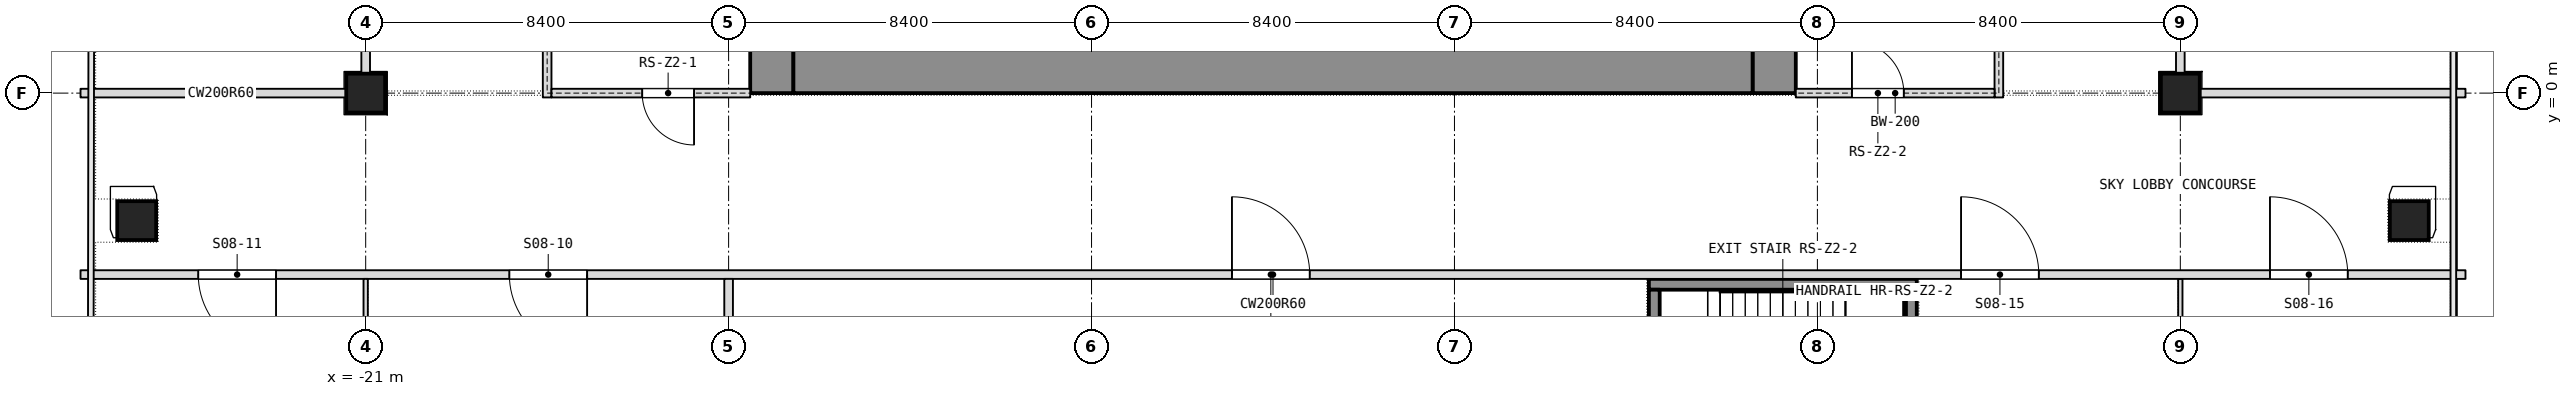
"""IFC4 building model, lengths in metres.
Left out: names, types, materials, properties, quantities, classifications, styles, units other than length and angle.
Written with IfcOpenShell. Run it as: python <this file> out.ifc"""

import sys

from ifc_helpers import new_model, si_unit, direction, frame, frame_2d, origin, origin_2d, place, context, subcontext, project, spatial, rectangle, extrude, element, fill, save


model = new_model("IFC4")
c1 = context("Model", 3, precision=1e-05, world=origin(), true_north=direction((0.0, 1.0)))
c2 = subcontext(c1, "Body", "Model", "MODEL_VIEW")
j1 = project(units=[si_unit("LENGTHUNIT", "METRE"), si_unit("PLANEANGLEUNIT", "RADIAN")], contexts=[c1])
p1 = place(None, origin())
s1 = spatial("IfcSite", under=j1, at=p1, CompositionType="ELEMENT")
p2 = place(p1, origin())
s2 = spatial("IfcBuilding", under=s1, at=p2, CompositionType="ELEMENT")
p3 = place(p2, frame((0.0, 0.0, 97.7)))
s3 = spatial("IfcBuildingStorey", under=s2, at=p3, CompositionType="ELEMENT", Elevation=97.7)
p4 = place(p3, frame((11.6, 0.0, 0.0), z_axis=(0.0, 0.0, 1.0), x_axis=(0.0, 1.0, 0.0)))
e1 = element("IfcWall", 1, at=p4, inside=s3, PredefinedType="SHEAR", context=c2, shape_type="SweptSolid", body=[
    extrude(rectangle(XDim=16.8, YDim=1.0, at=frame_2d((8.4, 0.0))), origin(), (0.0, 0.0, 1.0), 7.2),
])
p5 = place(p4, frame((2.3, 0.0, 0.0)))
e2 = element("IfcOpeningElement", 2, at=p5, cuts=e1, PredefinedType="OPENING", context=c2, shape_type="SweptSolid", body=[
    extrude(rectangle(XDim=1.1, YDim=2.1, at=frame_2d((0.55, 1.05))), frame((0.0, 0.5, 0.0), z_axis=(0.0, -1.0, 0.0), x_axis=(1.0, 0.0, 0.0)), (0.0, 0.0, 1.0), 1.0),
])
p6 = place(p4, frame((4.85, 0.0, 0.0)))
e3 = element("IfcOpeningElement", 3, at=p6, cuts=e1, PredefinedType="OPENING", context=c2, shape_type="SweptSolid", body=[
    extrude(rectangle(XDim=1.1, YDim=2.1, at=frame_2d((0.55, 1.05))), frame((0.0, 0.5, 0.0), z_axis=(0.0, -1.0, 0.0), x_axis=(1.0, 0.0, 0.0)), (0.0, 0.0, 1.0), 1.0),
])
p7 = place(p4, frame((6.825, 0.0, 0.0)))
e4 = element("IfcOpeningElement", 4, at=p7, cuts=e1, PredefinedType="OPENING", context=c2, shape_type="SweptSolid", body=[
    extrude(rectangle(XDim=1.2, YDim=2.1, at=frame_2d((0.6, 1.05))), frame((0.0, 0.5, 0.0), z_axis=(0.0, -1.0, 0.0), x_axis=(1.0, 0.0, 0.0)), (0.0, 0.0, 1.0), 1.0),
])
p8 = place(p4, frame((13.4, 0.0, 0.0)))
e5 = element("IfcOpeningElement", 5, at=p8, cuts=e1, PredefinedType="OPENING", context=c2, shape_type="SweptSolid", body=[
    extrude(rectangle(XDim=1.1, YDim=2.1, at=frame_2d((0.55, 1.05))), frame((0.0, 0.5, 0.0), z_axis=(0.0, -1.0, 0.0), x_axis=(1.0, 0.0, 0.0)), (0.0, 0.0, 1.0), 1.0),
])
p9 = place(p4, frame((10.85, 0.0, 0.0)))
e6 = element("IfcOpeningElement", 6, at=p9, cuts=e1, PredefinedType="OPENING", context=c2, shape_type="SweptSolid", body=[
    extrude(rectangle(XDim=1.1, YDim=2.1, at=frame_2d((0.55, 1.05))), frame((0.0, 0.5, 0.0), z_axis=(0.0, -1.0, 0.0), x_axis=(1.0, 0.0, 0.0)), (0.0, 0.0, 1.0), 1.0),
])
p10 = place(p4, frame((8.775, 0.0, 0.0)))
e7 = element("IfcOpeningElement", 7, at=p10, cuts=e1, PredefinedType="OPENING", context=c2, shape_type="SweptSolid", body=[
    extrude(rectangle(XDim=1.2, YDim=2.1, at=frame_2d((0.6, 1.05))), frame((0.0, 0.5, 0.0), z_axis=(0.0, -1.0, 0.0), x_axis=(1.0, 0.0, 0.0)), (0.0, 0.0, 1.0), 1.0),
])
p11 = place(p3, frame((-11.6, 0.0, 0.0), z_axis=(0.0, 0.0, 1.0), x_axis=(0.0, 1.0, 0.0)))
e8 = element("IfcWall", 8, at=p11, inside=s3, PredefinedType="SHEAR", context=c2, shape_type="SweptSolid", body=[
    extrude(rectangle(XDim=16.8, YDim=1.0, at=frame_2d((8.4, 0.0))), origin(), (0.0, 0.0, 1.0), 7.2),
])
p12 = place(p11, frame((2.3, 0.0, 0.0)))
e9 = element("IfcOpeningElement", 9, at=p12, cuts=e8, PredefinedType="OPENING", context=c2, shape_type="SweptSolid", body=[
    extrude(rectangle(XDim=1.1, YDim=2.1, at=frame_2d((0.55, 1.05))), frame((0.0, 0.5, 0.0), z_axis=(0.0, -1.0, 0.0), x_axis=(1.0, 0.0, 0.0)), (0.0, 0.0, 1.0), 1.0),
])
p13 = place(p11, frame((4.85, 0.0, 0.0)))
e10 = element("IfcOpeningElement", 10, at=p13, cuts=e8, PredefinedType="OPENING", context=c2, shape_type="SweptSolid", body=[
    extrude(rectangle(XDim=1.1, YDim=2.1, at=frame_2d((0.55, 1.05))), frame((0.0, 0.5, 0.0), z_axis=(0.0, -1.0, 0.0), x_axis=(1.0, 0.0, 0.0)), (0.0, 0.0, 1.0), 1.0),
])
p14 = place(p11, frame((6.825, 0.0, 0.0)))
e11 = element("IfcOpeningElement", 11, at=p14, cuts=e8, PredefinedType="OPENING", context=c2, shape_type="SweptSolid", body=[
    extrude(rectangle(XDim=1.2, YDim=2.1, at=frame_2d((0.6, 1.05))), frame((0.0, 0.5, 0.0), z_axis=(0.0, -1.0, 0.0), x_axis=(1.0, 0.0, 0.0)), (0.0, 0.0, 1.0), 1.0),
])
p15 = place(p11, frame((13.4, 0.0, 0.0)))
e12 = element("IfcOpeningElement", 12, at=p15, cuts=e8, PredefinedType="OPENING", context=c2, shape_type="SweptSolid", body=[
    extrude(rectangle(XDim=1.1, YDim=2.1, at=frame_2d((0.55, 1.05))), frame((0.0, 0.5, 0.0), z_axis=(0.0, -1.0, 0.0), x_axis=(1.0, 0.0, 0.0)), (0.0, 0.0, 1.0), 1.0),
])
p16 = place(p11, frame((10.85, 0.0, 0.0)))
e13 = element("IfcOpeningElement", 13, at=p16, cuts=e8, PredefinedType="OPENING", context=c2, shape_type="SweptSolid", body=[
    extrude(rectangle(XDim=1.1, YDim=2.1, at=frame_2d((0.55, 1.05))), frame((0.0, 0.5, 0.0), z_axis=(0.0, -1.0, 0.0), x_axis=(1.0, 0.0, 0.0)), (0.0, 0.0, 1.0), 1.0),
])
p17 = place(p11, frame((8.775, 0.0, 0.0)))
e14 = element("IfcOpeningElement", 14, at=p17, cuts=e8, PredefinedType="OPENING", context=c2, shape_type="SweptSolid", body=[
    extrude(rectangle(XDim=1.2, YDim=2.1, at=frame_2d((0.6, 1.05))), frame((0.0, 0.5, 0.0), z_axis=(0.0, -1.0, 0.0), x_axis=(1.0, 0.0, 0.0)), (0.0, 0.0, 1.0), 1.0),
])
p18 = place(p3, frame((-11.1, 0.5, 0.0), z_axis=(0.0, 0.0, 1.0), x_axis=(1.0, 0.0, 0.0)))
e15 = element("IfcWall", 15, at=p18, inside=s3, PredefinedType="SHEAR", context=c2, shape_type="SweptSolid", body=[
    extrude(rectangle(XDim=22.2, YDim=1.0, at=frame_2d((11.1, 0.0))), origin(), (0.0, 0.0, 1.0), 7.2),
])
for number, where, z_axis, x_axis in (
    (16, (-21.0, 0.0, 0.0), (0.0, 0.0, 1.0), (1.0, 0.0, 0.0)),
    (17, (21.0, 0.0, 0.0), (0.0, 0.0, 1.0), (1.0, 0.0, 0.0)),
    (18, (-26.3, -2.951, 0.0), (0.0, 0.0, 1.0), (1.0, 0.0, 0.0)),
    (19, (26.3, -2.951, 0.0), (0.0, 0.0, 1.0), (1.0, 0.0, 0.0)),
):
    element("IfcColumn", number, at=place(p3, frame(where, z_axis=z_axis, x_axis=x_axis)), inside=s3, PredefinedType="COLUMN", context=c2, shape_type="SweptSolid", body=[
        extrude(rectangle(XDim=0.9, YDim=0.9, at=origin_2d()), origin(), (0.0, 0.0, 1.0), 7.2),
    ])
p19 = place(p3, frame((21.0, -7.93, 0.0), z_axis=(0.0, 0.0, 1.0), x_axis=(0.0, 1.0, 0.0)))
e20 = element("IfcWall", 20, at=p19, inside=s3, PredefinedType="PARTITIONING", context=c2, shape_type="SweptSolid", body=[
    extrude(rectangle(XDim=3.63, YDim=0.1, at=frame_2d((1.815, 0.0))), origin(), (0.0, 0.0, 1.0), 6.94),
])
p20 = place(p3, frame((21.0, -0.1, 0.0), z_axis=(0.0, 0.0, 1.0), x_axis=(0.0, 1.0, 0.0)))
e21 = element("IfcWall", 21, at=p20, inside=s3, PredefinedType="PARTITIONING", context=c2, shape_type="SweptSolid", body=[
    extrude(rectangle(XDim=25.3, YDim=0.2, at=frame_2d((12.65, 0.0))), origin(), (0.0, 0.0, 1.0), 6.94),
])
p21 = place(p20, frame((3.8, 0.0, 0.0)))
e22 = element("IfcOpeningElement", 22, at=p21, cuts=e21, PredefinedType="OPENING", context=c2, shape_type="SweptSolid", body=[
    extrude(rectangle(XDim=1.0, YDim=2.1, at=frame_2d((0.5, 1.05))), frame((0.0, 0.1, 0.0), z_axis=(0.0, -1.0, 0.0), x_axis=(1.0, 0.0, 0.0)), (0.0, 0.0, 1.0), 0.2),
])
p22 = place(p20, frame((10.1, 0.0, 0.0)))
e23 = element("IfcOpeningElement", 23, at=p22, cuts=e21, PredefinedType="OPENING", context=c2, shape_type="SweptSolid", body=[
    extrude(rectangle(XDim=1.0, YDim=2.1, at=frame_2d((0.5, 1.05))), frame((0.0, 0.1, 0.0), z_axis=(0.0, -1.0, 0.0), x_axis=(1.0, 0.0, 0.0)), (0.0, 0.0, 1.0), 0.2),
])
p23 = place(p20, frame((14.3, 0.0, 0.0)))
e24 = element("IfcOpeningElement", 24, at=p23, cuts=e21, PredefinedType="OPENING", context=c2, shape_type="SweptSolid", body=[
    extrude(rectangle(XDim=1.0, YDim=2.1, at=frame_2d((0.5, 1.05))), frame((0.0, 0.1, 0.0), z_axis=(0.0, -1.0, 0.0), x_axis=(1.0, 0.0, 0.0)), (0.0, 0.0, 1.0), 0.2),
])
p24 = place(p20, frame((20.55, 0.0, 0.0)))
e25 = element("IfcOpeningElement", 25, at=p24, cuts=e21, PredefinedType="OPENING", context=c2, shape_type="SweptSolid", body=[
    extrude(rectangle(XDim=1.0, YDim=2.1, at=frame_2d((0.5, 1.05))), frame((0.0, 0.1, 0.0), z_axis=(0.0, -1.0, 0.0), x_axis=(1.0, 0.0, 0.0)), (0.0, 0.0, 1.0), 0.2),
])
p25 = place(p3, frame((-27.6, -4.2, 0.0), z_axis=(0.0, 0.0, 1.0), x_axis=(1.0, 0.0, 0.0)))
e26 = element("IfcWall", 26, at=p25, inside=s3, PredefinedType="PARTITIONING", context=c2, shape_type="SweptSolid", body=[
    extrude(rectangle(XDim=55.2, YDim=0.2, at=frame_2d((27.6, 0.0))), origin(), (0.0, 0.0, 1.0), 6.94),
])
p26 = place(p25, frame((9.925, 0.0, 0.0)))
e27 = element("IfcOpeningElement", 27, at=p26, cuts=e26, PredefinedType="OPENING", context=c2, shape_type="SweptSolid", body=[
    extrude(rectangle(XDim=1.8, YDim=2.1, at=frame_2d((0.9, 1.05))), frame((0.0, 0.1, 0.0), z_axis=(0.0, -1.0, 0.0), x_axis=(1.0, 0.0, 0.0)), (0.0, 0.0, 1.0), 0.2),
])
p27 = place(p25, frame((2.725, 0.0, 0.0)))
e28 = element("IfcOpeningElement", 28, at=p27, cuts=e26, PredefinedType="OPENING", context=c2, shape_type="SweptSolid", body=[
    extrude(rectangle(XDim=1.8, YDim=2.1, at=frame_2d((0.9, 1.05))), frame((0.0, 0.1, 0.0), z_axis=(0.0, -1.0, 0.0), x_axis=(1.0, 0.0, 0.0)), (0.0, 0.0, 1.0), 0.2),
])
p28 = place(p25, frame((26.65, 0.0, 0.0)))
e29 = element("IfcOpeningElement", 29, at=p28, cuts=e26, PredefinedType="OPENING", context=c2, shape_type="SweptSolid", body=[
    extrude(rectangle(XDim=1.8, YDim=2.1, at=frame_2d((0.9, 1.05))), frame((0.0, 0.1, 0.0), z_axis=(0.0, -1.0, 0.0), x_axis=(1.0, 0.0, 0.0)), (0.0, 0.0, 1.0), 0.2),
])
p29 = place(p25, frame((43.525, 0.0, 0.0)))
e30 = element("IfcOpeningElement", 30, at=p29, cuts=e26, PredefinedType="OPENING", context=c2, shape_type="SweptSolid", body=[
    extrude(rectangle(XDim=1.8, YDim=2.1, at=frame_2d((0.9, 1.05))), frame((0.0, 0.1, 0.0), z_axis=(0.0, -1.0, 0.0), x_axis=(1.0, 0.0, 0.0)), (0.0, 0.0, 1.0), 0.2),
])
p30 = place(p25, frame((50.675, 0.0, 0.0)))
e31 = element("IfcOpeningElement", 31, at=p30, cuts=e26, PredefinedType="OPENING", context=c2, shape_type="SweptSolid", body=[
    extrude(rectangle(XDim=1.8, YDim=2.1, at=frame_2d((0.9, 1.05))), frame((0.0, 0.1, 0.0), z_axis=(0.0, -1.0, 0.0), x_axis=(1.0, 0.0, 0.0)), (0.0, 0.0, 1.0), 0.2),
])
for number, where, z_axis, x_axis in (
    (32, (-27.6, 0.0, 0.0), (0.0, 0.0, 1.0), (1.0, 0.0, 0.0)),
    (33, (21.1, 0.0, 0.0), (0.0, 0.0, 1.0), (1.0, 0.0, 0.0)),
):
    element("IfcWall", number, at=place(p3, frame(where, z_axis=z_axis, x_axis=x_axis)), inside=s3, PredefinedType="PARTITIONING", context=c2, shape_type="SweptSolid", body=[
        extrude(rectangle(XDim=6.5, YDim=0.2, at=frame_2d((3.25, 0.0))), origin(), (0.0, 0.0, 1.0), 6.49),
    ])
p31 = place(p3, frame((-12.6, -21.175, 0.0), z_axis=(0.0, 0.0, 1.0), x_axis=(0.0, 1.0, 0.0)))
e34 = element("IfcWall", 34, at=p31, inside=s3, PredefinedType="PARTITIONING", context=c2, shape_type="SweptSolid", body=[
    extrude(rectangle(XDim=16.875, YDim=0.2, at=frame_2d((8.438, 0.0))), origin(), (0.0, 0.0, 1.0), 6.94),
])
p32 = place(p3, frame((-21.0, -7.93, 0.0), z_axis=(0.0, 0.0, 1.0), x_axis=(0.0, 1.0, 0.0)))
e35 = element("IfcWall", 35, at=p32, inside=s3, PredefinedType="PARTITIONING", context=c2, shape_type="SweptSolid", body=[
    extrude(rectangle(XDim=3.63, YDim=0.1, at=frame_2d((1.815, 0.0))), origin(), (0.0, 0.0, 1.0), 6.94),
])
p33 = place(p3, frame((-21.0, -0.1, 0.0), z_axis=(0.0, 0.0, 1.0), x_axis=(0.0, 1.0, 0.0)))
e36 = element("IfcWall", 36, at=p33, inside=s3, PredefinedType="PARTITIONING", context=c2, shape_type="SweptSolid", body=[
    extrude(rectangle(XDim=9.6, YDim=0.2, at=frame_2d((4.8, 0.0))), origin(), (0.0, 0.0, 1.0), 6.94),
])
p34 = place(p33, frame((3.8, 0.0, 0.0)))
e37 = element("IfcOpeningElement", 37, at=p34, cuts=e36, PredefinedType="OPENING", context=c2, shape_type="SweptSolid", body=[
    extrude(rectangle(XDim=1.0, YDim=2.1, at=frame_2d((0.5, 1.05))), frame((0.0, 0.1, 0.0), z_axis=(0.0, -1.0, 0.0), x_axis=(1.0, 0.0, 0.0)), (0.0, 0.0, 1.0), 0.2),
])
p35 = place(p3, frame((-16.8, -0.1, 0.0), z_axis=(0.0, 0.0, 1.0), x_axis=(0.0, 1.0, 0.0)))
e38 = element("IfcWall", 38, at=p35, inside=s3, PredefinedType="PARTITIONING", context=c2, shape_type="SweptSolid", body=[
    extrude(rectangle(XDim=17.0, YDim=0.2, at=frame_2d((8.5, 0.0))), origin(), (0.0, 0.0, 1.0), 6.94),
])
p36 = place(p35, frame((1.9, 0.0, 0.0)))
e39 = element("IfcOpeningElement", 39, at=p36, cuts=e38, PredefinedType="OPENING", context=c2, shape_type="SweptSolid", body=[
    extrude(rectangle(XDim=2.4, YDim=2.1, at=frame_2d((1.2, 1.05))), frame((0.0, 0.1, 0.0), z_axis=(0.0, -1.0, 0.0), x_axis=(1.0, 0.0, 0.0)), (0.0, 0.0, 1.0), 0.2),
])
p37 = place(p35, frame((4.4, 0.0, 0.0)))
e40 = element("IfcOpeningElement", 40, at=p37, cuts=e38, PredefinedType="OPENING", context=c2, shape_type="SweptSolid", body=[
    extrude(rectangle(XDim=2.4, YDim=2.1, at=frame_2d((1.2, 1.05))), frame((0.0, 0.1, 0.0), z_axis=(0.0, -1.0, 0.0), x_axis=(1.0, 0.0, 0.0)), (0.0, 0.0, 1.0), 0.2),
])
p38 = place(p3, frame((-16.7, 0.0, 0.0), z_axis=(0.0, 0.0, 1.0), x_axis=(1.0, 0.0, 0.0)))
e41 = element("IfcWall", 41, at=p38, inside=s3, PredefinedType="PARTITIONING", context=c2, shape_type="SweptSolid", body=[
    extrude(rectangle(XDim=4.6, YDim=0.2, at=frame_2d((2.3, 0.0))), origin(), (0.0, 0.0, 1.0), 6.49),
])
p39 = place(p38, frame((2.1, 0.0, 0.0)))
e42 = element("IfcOpeningElement", 42, at=p39, cuts=e41, PredefinedType="OPENING", context=c2, shape_type="SweptSolid", body=[
    extrude(rectangle(XDim=1.2, YDim=2.1, at=frame_2d((0.6, 1.05))), frame((0.0, 0.1, 0.0), z_axis=(0.0, -1.0, 0.0), x_axis=(1.0, 0.0, 0.0)), (0.0, 0.0, 1.0), 0.2),
])
p40 = place(p3, frame((16.8, -0.1, 0.0), z_axis=(0.0, 0.0, 1.0), x_axis=(0.0, 1.0, 0.0)))
e43 = element("IfcWall", 43, at=p40, inside=s3, PredefinedType="PARTITIONING", context=c2, shape_type="SweptSolid", body=[
    extrude(rectangle(XDim=17.0, YDim=0.2, at=frame_2d((8.5, 0.0))), origin(), (0.0, 0.0, 1.0), 6.94),
])
p41 = place(p40, frame((1.9, 0.0, 0.0)))
e44 = element("IfcOpeningElement", 44, at=p41, cuts=e43, PredefinedType="OPENING", context=c2, shape_type="SweptSolid", body=[
    extrude(rectangle(XDim=2.4, YDim=2.1, at=frame_2d((1.2, 1.05))), frame((0.0, 0.1, 0.0), z_axis=(0.0, -1.0, 0.0), x_axis=(1.0, 0.0, 0.0)), (0.0, 0.0, 1.0), 0.2),
])
p42 = place(p40, frame((12.7, 0.0, 0.0)))
e45 = element("IfcOpeningElement", 45, at=p42, cuts=e43, PredefinedType="OPENING", context=c2, shape_type="SweptSolid", body=[
    extrude(rectangle(XDim=2.4, YDim=2.1, at=frame_2d((1.2, 1.05))), frame((0.0, 0.1, 0.0), z_axis=(0.0, -1.0, 0.0), x_axis=(1.0, 0.0, 0.0)), (0.0, 0.0, 1.0), 0.2),
])
p43 = place(p3, frame((12.1, 0.0, 0.0), z_axis=(0.0, 0.0, 1.0), x_axis=(1.0, 0.0, 0.0)))
e46 = element("IfcWall", 46, at=p43, inside=s3, PredefinedType="PARTITIONING", context=c2, shape_type="SweptSolid", body=[
    extrude(rectangle(XDim=4.6, YDim=0.2, at=frame_2d((2.3, 0.0))), origin(), (0.0, 0.0, 1.0), 6.49),
])
p44 = place(p43, frame((1.3, 0.0, 0.0)))
e47 = element("IfcOpeningElement", 47, at=p44, cuts=e46, PredefinedType="OPENING", context=c2, shape_type="SweptSolid", body=[
    extrude(rectangle(XDim=1.2, YDim=2.1, at=frame_2d((0.6, 1.05))), frame((0.0, 0.1, 0.0), z_axis=(0.0, -1.0, 0.0), x_axis=(1.0, 0.0, 0.0)), (0.0, 0.0, 1.0), 0.2),
])
p45 = place(p3, frame((8.7, -4.425, -0.26), z_axis=(0.0, 0.0, 1.0), x_axis=(1.0, 0.0, 0.0)))
e48 = element("IfcWall", 48, at=p45, inside=s3, PredefinedType="SHEAR", context=c2, shape_type="SweptSolid", body=[
    extrude(rectangle(XDim=6.2, YDim=0.25, at=frame_2d((3.1, 0.0))), origin(), (0.0, 0.0, 1.0), 7.56),
])
p46 = place(p3, frame((8.825, -7.45, -0.26), z_axis=(0.0, 0.0, 1.0), x_axis=(0.0, 1.0, 0.0)))
e49 = element("IfcWall", 49, at=p46, inside=s3, PredefinedType="SHEAR", context=c2, shape_type="SweptSolid", body=[
    extrude(rectangle(XDim=2.9, YDim=0.25, at=frame_2d((1.45, 0.0))), origin(), (0.0, 0.0, 1.0), 7.56),
])
p47 = place(p46, frame((0.95, 0.0, 0.0)))
e50 = element("IfcOpeningElement", 50, at=p47, cuts=e49, PredefinedType="OPENING", context=c2, shape_type="SweptSolid", body=[
    extrude(rectangle(XDim=1.0, YDim=2.1, at=frame_2d((0.5, 1.05))), frame((0.0, 0.125, 0.0), z_axis=(0.0, -1.0, 0.0), x_axis=(1.0, 0.0, 0.0)), (0.0, 0.0, 1.0), 0.25),
])
p48 = place(p3, frame((14.775, -7.45, -0.26), z_axis=(0.0, 0.0, 1.0), x_axis=(0.0, 1.0, 0.0)))
e51 = element("IfcWall", 51, at=p48, inside=s3, PredefinedType="SHEAR", context=c2, shape_type="SweptSolid", body=[
    extrude(rectangle(XDim=2.9, YDim=0.25, at=frame_2d((1.45, 0.0))), origin(), (0.0, 0.0, 1.0), 7.56),
])
p49 = place(p26, origin())
e52 = element("IfcDoor", 52, at=p49, inside=s3, OperationType="DOUBLE_DOOR_SINGLE_SWING", PredefinedType="DOOR", context=c2, shape_type="SweptSolid", body=[
    extrude(rectangle(XDim=1.8, YDim=2.1, at=frame_2d((0.9, 1.05))), frame((0.0, 0.025, 0.0), z_axis=(0.0, -1.0, 0.0), x_axis=(1.0, 0.0, 0.0)), (0.0, 0.0, 1.0), 0.05),
])
fill(e27, e52)
p50 = place(p27, origin())
e53 = element("IfcDoor", 53, at=p50, inside=s3, OperationType="DOUBLE_DOOR_SINGLE_SWING", PredefinedType="DOOR", context=c2, shape_type="SweptSolid", body=[
    extrude(rectangle(XDim=1.8, YDim=2.1, at=frame_2d((0.9, 1.05))), frame((0.0, 0.025, 0.0), z_axis=(0.0, -1.0, 0.0), x_axis=(1.0, 0.0, 0.0)), (0.0, 0.0, 1.0), 0.05),
])
fill(e28, e53)
p51 = place(p28, origin())
e54 = element("IfcDoor", 54, at=p51, inside=s3, OperationType="DOUBLE_DOOR_SINGLE_SWING", PredefinedType="DOOR", context=c2, shape_type="SweptSolid", body=[
    extrude(rectangle(XDim=1.8, YDim=2.1, at=frame_2d((0.9, 1.05))), frame((0.0, 0.025, 0.0), z_axis=(0.0, -1.0, 0.0), x_axis=(1.0, 0.0, 0.0)), (0.0, 0.0, 1.0), 0.05),
])
fill(e29, e54)
p52 = place(p29, origin())
e55 = element("IfcDoor", 55, at=p52, inside=s3, OperationType="DOUBLE_DOOR_SINGLE_SWING", PredefinedType="DOOR", context=c2, shape_type="SweptSolid", body=[
    extrude(rectangle(XDim=1.8, YDim=2.1, at=frame_2d((0.9, 1.05))), frame((0.0, 0.025, 0.0), z_axis=(0.0, -1.0, 0.0), x_axis=(1.0, 0.0, 0.0)), (0.0, 0.0, 1.0), 0.05),
])
fill(e30, e55)
p53 = place(p30, origin())
e56 = element("IfcDoor", 56, at=p53, inside=s3, OperationType="DOUBLE_DOOR_SINGLE_SWING", PredefinedType="DOOR", context=c2, shape_type="SweptSolid", body=[
    extrude(rectangle(XDim=1.8, YDim=2.1, at=frame_2d((0.9, 1.05))), frame((0.0, 0.025, 0.0), z_axis=(0.0, -1.0, 0.0), x_axis=(1.0, 0.0, 0.0)), (0.0, 0.0, 1.0), 0.05),
])
fill(e31, e56)
p54 = place(p39, origin())
e57 = element("IfcDoor", 57, at=p54, inside=s3, OperationType="SINGLE_SWING_LEFT", PredefinedType="DOOR", context=c2, shape_type="SweptSolid", body=[
    extrude(rectangle(XDim=1.2, YDim=2.1, at=frame_2d((0.6, 1.05))), frame((0.0, 0.025, 0.0), z_axis=(0.0, -1.0, 0.0), x_axis=(1.0, 0.0, 0.0)), (0.0, 0.0, 1.0), 0.05),
])
fill(e42, e57)
p55 = place(p44, origin())
e58 = element("IfcDoor", 58, at=p55, inside=s3, OperationType="SINGLE_SWING_LEFT", PredefinedType="DOOR", context=c2, shape_type="SweptSolid", body=[
    extrude(rectangle(XDim=1.2, YDim=2.1, at=frame_2d((0.6, 1.05))), frame((0.0, 0.025, 0.0), z_axis=(0.0, -1.0, 0.0), x_axis=(1.0, 0.0, 0.0)), (0.0, 0.0, 1.0), 0.05),
])
fill(e47, e58)
save(model, sys.argv[1])
